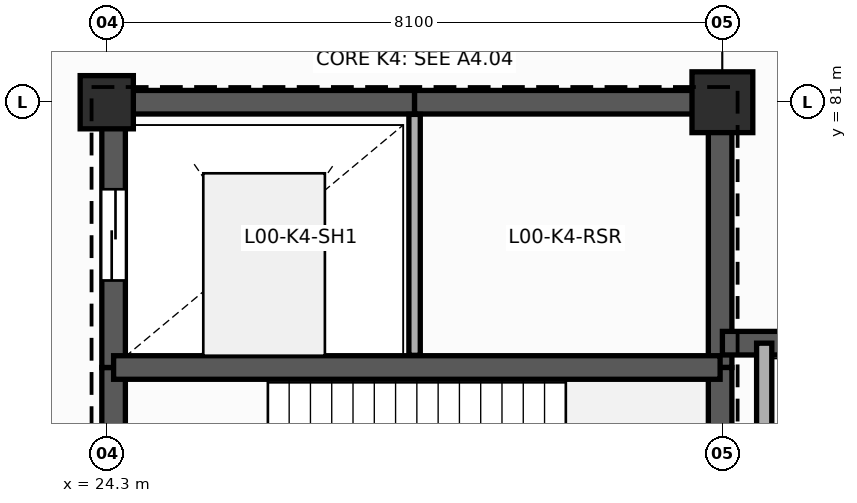
"""IFC4 building model, lengths in metres.
Left out: names, types, materials, properties, quantities, classifications, styles, units other than length and angle.
Written with IfcOpenShell. Run it as: python <this file> out.ifc"""

import sys

from ifc_helpers import new_model, si_unit, direction, frame, frame_2d, origin, origin_2d, place, context, subcontext, project, spatial, rectangle, extrude, element, fill, save


model = new_model("IFC4")
c1 = context("Model", 3, precision=1e-05, world=origin(), true_north=direction((0.0, 1.0)))
c2 = subcontext(c1, "Body", "Model", "MODEL_VIEW")
j1 = project(units=[si_unit("LENGTHUNIT", "METRE"), si_unit("PLANEANGLEUNIT", "RADIAN")], contexts=[c1])
p1 = place(None, origin())
s1 = spatial("IfcSite", under=j1, at=p1, CompositionType="ELEMENT")
p2 = place(p1, origin())
s2 = spatial("IfcBuilding", under=s1, at=p2, CompositionType="ELEMENT")
p3 = place(p2, origin())
s3 = spatial("IfcBuildingStorey", under=s2, at=p3, CompositionType="ELEMENT", Elevation=0.0)
p4 = place(p3, frame((24.3, 81.0, 0.0), z_axis=(0.0, 0.0, 1.0), x_axis=(1.0, 0.0, 0.0)))
e1 = element("IfcColumn", 1, at=p4, inside=s3, PredefinedType="COLUMN", context=c2, shape_type="SweptSolid", body=[
    extrude(rectangle(XDim=0.7, YDim=0.7, at=origin_2d()), origin(), (0.0, 0.0, 1.0), 5.4),
])
p5 = place(p3, frame((32.4, 81.0, 0.0), z_axis=(0.0, 0.0, 1.0), x_axis=(1.0, 0.0, 0.0)))
e2 = element("IfcColumn", 2, at=p5, inside=s3, PredefinedType="COLUMN", context=c2, shape_type="SweptSolid", body=[
    extrude(rectangle(XDim=0.8, YDim=0.8, at=origin_2d()), origin(), (0.0, 0.0, 1.0), 5.4),
])
p6 = place(p3, frame((24.39, 73.15, 0.0), z_axis=(0.0, 0.0, 1.0), x_axis=(0.0, 1.0, 0.0)))
e3 = element("IfcWall", 3, at=p6, inside=s3, PredefinedType="SHEAR", context=c2, shape_type="SweptSolid", body=[
    extrude(rectangle(XDim=4.36, YDim=0.31, at=frame_2d((2.18, 0.0))), origin(), (0.0, 0.0, 1.0), 5.4),
])
p7 = place(p6, frame((1.35, 0.0, 0.0)))
e4 = element("IfcOpeningElement", 4, at=p7, cuts=e3, PredefinedType="OPENING", context=c2, shape_type="SweptSolid", body=[
    extrude(rectangle(XDim=1.2, YDim=2.25, at=frame_2d((0.6, 1.125))), frame((0.0, 0.165, 0.0), z_axis=(0.0, -1.0, 0.0), x_axis=(1.0, 0.0, 0.0)), (0.0, 0.0, 1.0), 0.33),
])
p8 = place(p3, frame((24.39, 77.51, 0.0), z_axis=(0.0, 0.0, 1.0), x_axis=(0.0, 1.0, 0.0)))
e5 = element("IfcWall", 5, at=p8, inside=s3, PredefinedType="SHEAR", context=c2, shape_type="SweptSolid", body=[
    extrude(rectangle(XDim=3.49, YDim=0.31, at=frame_2d((1.745, 0.0))), origin(), (0.0, 0.0, 1.0), 5.4),
])
p9 = place(p8, frame((1.145, 0.0, 0.0)))
e6 = element("IfcOpeningElement", 6, at=p9, cuts=e5, PredefinedType="OPENING", context=c2, shape_type="SweptSolid", body=[
    extrude(rectangle(XDim=1.2, YDim=2.2, at=frame_2d((0.6, 1.1))), frame((0.0, 0.165, 0.0), z_axis=(0.0, -1.0, 0.0), x_axis=(1.0, 0.0, 0.0)), (0.0, 0.0, 1.0), 0.33),
])
p10 = place(p3, frame((24.39, 81.0, 0.0), z_axis=(0.0, 0.0, 1.0), x_axis=(1.0, 0.0, 0.0)))
e7 = element("IfcWall", 7, at=p10, inside=s3, PredefinedType="SHEAR", context=c2, shape_type="SweptSolid", body=[
    extrude(rectangle(XDim=3.96, YDim=0.31, at=frame_2d((1.98, 0.0))), origin(), (0.0, 0.0, 1.0), 5.4),
])
p11 = place(p3, frame((28.35, 81.0, 0.0), z_axis=(0.0, 0.0, 1.0), x_axis=(1.0, 0.0, 0.0)))
e8 = element("IfcWall", 8, at=p11, inside=s3, PredefinedType="SHEAR", context=c2, shape_type="SweptSolid", body=[
    extrude(rectangle(XDim=4.02, YDim=0.31, at=frame_2d((2.01, 0.0))), origin(), (0.0, 0.0, 1.0), 5.4),
])
p12 = place(p3, frame((32.37, 81.0, 0.0), z_axis=(0.0, 0.0, 1.0), x_axis=(0.0, -1.0, 0.0)))
e9 = element("IfcWall", 9, at=p12, inside=s3, PredefinedType="SHEAR", context=c2, shape_type="SweptSolid", body=[
    extrude(rectangle(XDim=3.49, YDim=0.31, at=frame_2d((1.745, 0.0))), origin(), (0.0, 0.0, 1.0), 5.4),
])
p13 = place(p3, frame((32.37, 77.51, 0.0), z_axis=(0.0, 0.0, 1.0), x_axis=(0.0, -1.0, 0.0)))
e10 = element("IfcWall", 10, at=p13, inside=s3, PredefinedType="SHEAR", context=c2, shape_type="SweptSolid", body=[
    extrude(rectangle(XDim=4.36, YDim=0.31, at=frame_2d((2.18, 0.0))), origin(), (0.0, 0.0, 1.0), 5.4),
])
p14 = place(p3, frame((24.39, 77.51, 0.0), z_axis=(0.0, 0.0, 1.0), x_axis=(1.0, 0.0, 0.0)))
e11 = element("IfcWall", 11, at=p14, inside=s3, PredefinedType="SHEAR", context=c2, shape_type="SweptSolid", body=[
    extrude(rectangle(XDim=7.98, YDim=0.31, at=frame_2d((3.99, 0.0))), origin(), (0.0, 0.0, 1.0), 5.4),
])
p15 = place(p3, frame((28.35, 77.67, 0.0), z_axis=(0.0, 0.0, 1.0), x_axis=(0.0, 1.0, 0.0)))
e12 = element("IfcWall", 12, at=p15, inside=s3, PredefinedType="PLUMBINGWALL", context=c2, shape_type="SweptSolid", body=[
    extrude(rectangle(XDim=3.17, YDim=0.15, at=frame_2d((1.585, 0.0))), origin(), (0.0, 0.0, 1.0), 5.05),
])
p16 = place(p3, frame((41.195, 77.83, 0.0), z_axis=(0.0, 0.0, 1.0), x_axis=(-1.0, 0.0, 0.0)))
e13 = element("IfcWall", 13, at=p16, inside=s3, PredefinedType="SHEAR", context=c2, shape_type="SweptSolid", body=[
    extrude(rectangle(XDim=8.795, YDim=0.31, at=frame_2d((4.397, 0.0))), origin(), (0.0, 0.0, 1.0), 5.4),
])
p17 = place(p3, frame((32.95, 73.35, 0.0), z_axis=(0.0, 0.0, 1.0), x_axis=(0.0, 1.0, 0.0)))
e14 = element("IfcWall", 14, at=p17, inside=s3, PredefinedType="PARTITIONING", context=c2, shape_type="SweptSolid", body=[
    extrude(rectangle(XDim=4.48, YDim=0.2, at=frame_2d((2.24, 0.0))), origin(), (0.0, 0.0, 1.0), 5.05),
])
p18 = place(p17, frame((1.25, 0.0, 0.0)))
e15 = element("IfcOpeningElement", 15, at=p18, cuts=e14, PredefinedType="OPENING", context=c2, shape_type="SweptSolid", body=[
    extrude(rectangle(XDim=1.2, YDim=2.25, at=frame_2d((0.6, 1.125))), frame((0.0, 0.11, 0.0), z_axis=(0.0, -1.0, 0.0), x_axis=(1.0, 0.0, 0.0)), (0.0, 0.0, 1.0), 0.22),
])
p19 = place(p9, origin())
e16 = element("IfcDoor", 16, at=p19, inside=s3, OperationType="SLIDING_TO_LEFT", PredefinedType="DOOR", context=c2, shape_type="SweptSolid", body=[
    extrude(rectangle(XDim=1.2, YDim=2.2, at=frame_2d((0.6, 1.1))), frame((0.0, 0.025, 0.0), z_axis=(0.0, -1.0, 0.0), x_axis=(1.0, 0.0, 0.0)), (0.0, 0.0, 1.0), 0.05),
])
fill(e6, e16)
save(model, sys.argv[1])
